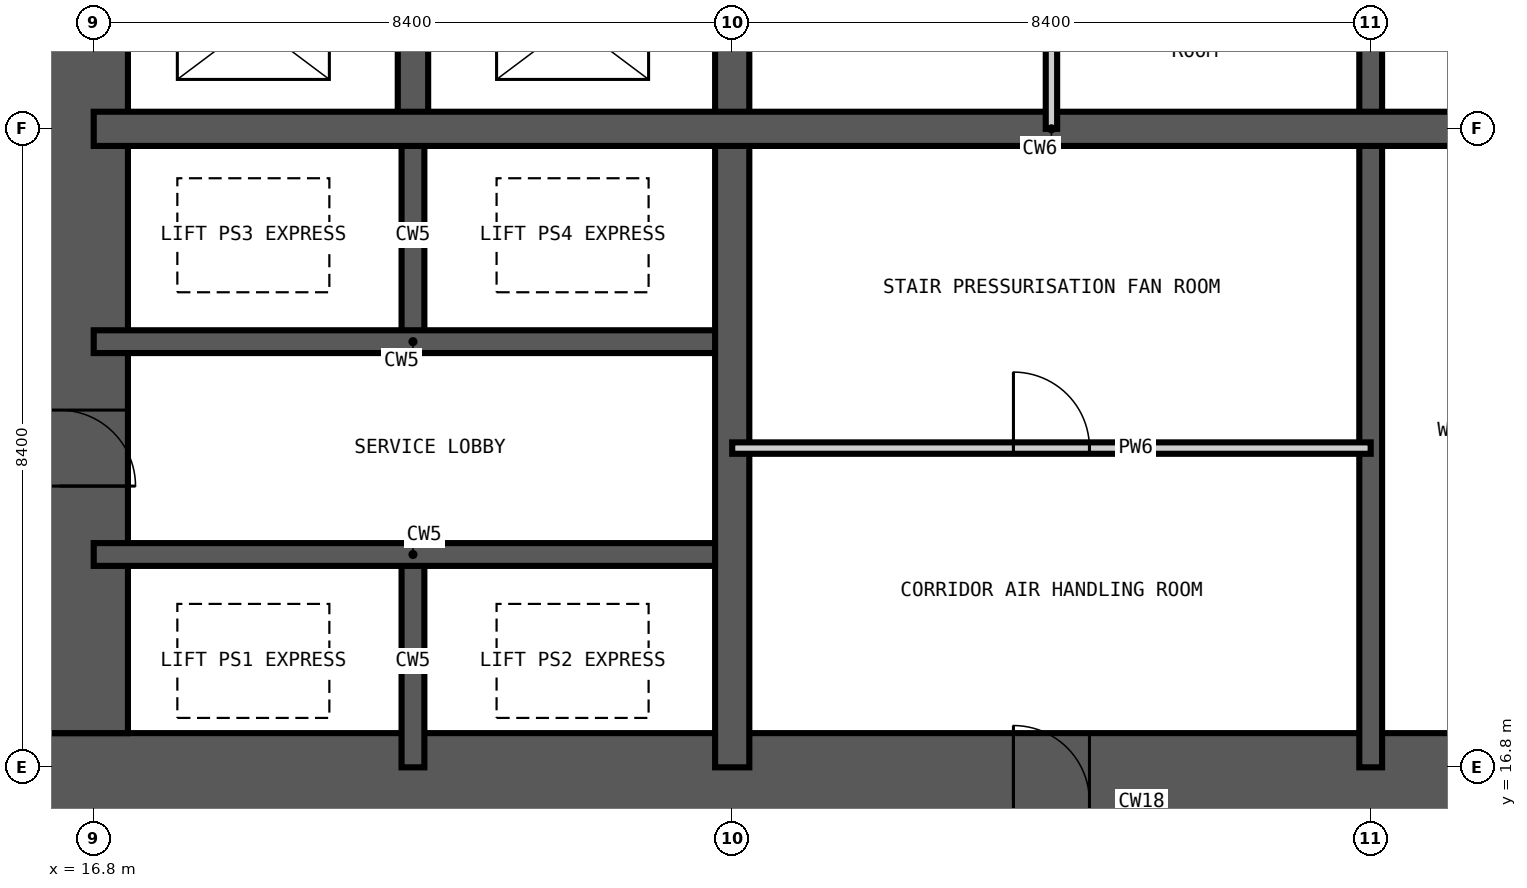
"""IFC4 building model, lengths in metres.
Left out: names, types, materials, properties, quantities, classifications, styles, units other than length and angle.
Written with IfcOpenShell. Run it as: python <this file> out.ifc"""

import sys

from ifc_helpers import new_model, si_unit, direction, frame, frame_2d, origin, place, context, subcontext, project, spatial, rectangle, extrude, element, fill, save


model = new_model("IFC4")
c1 = context("Model", 3, precision=1e-05, world=origin(), true_north=direction((0.0, 1.0)))
c2 = subcontext(c1, "Body", "Model", "MODEL_VIEW")
j1 = project(units=[si_unit("LENGTHUNIT", "METRE"), si_unit("PLANEANGLEUNIT", "RADIAN")], contexts=[c1])
p1 = place(None, origin())
s1 = spatial("IfcSite", under=j1, at=p1, CompositionType="ELEMENT")
p2 = place(p1, origin())
s2 = spatial("IfcBuilding", under=s1, at=p2, CompositionType="ELEMENT")
p3 = place(p2, frame((0.0, 0.0, 34.2)))
s3 = spatial("IfcBuildingStorey", under=s2, at=p3, CompositionType="ELEMENT", Elevation=34.2)
p4 = place(p3, frame((15.45, 16.35, -0.35), z_axis=(0.0, 0.0, 1.0), x_axis=(1.0, 0.0, 0.0)))
e1 = element("IfcWall", 1, at=p4, inside=s3, PredefinedType="SHEAR", context=c2, shape_type="SweptSolid", body=[
    extrude(rectangle(XDim=27.9, YDim=1.8, at=frame_2d((13.95, 0.0))), origin(), (0.0, 0.0, 1.0), 3.6),
])
p5 = place(p4, frame((13.45, 0.0, 0.35)))
e2 = element("IfcOpeningElement", 2, at=p5, cuts=e1, PredefinedType="OPENING", context=c2, shape_type="SweptSolid", body=[
    extrude(rectangle(XDim=1.0, YDim=2.1, at=frame_2d((0.5, 1.05))), frame((0.0, 0.91, 0.0), z_axis=(0.0, -1.0, 0.0), x_axis=(1.0, 0.0, 0.0)), (0.0, 0.0, 1.0), 1.82),
])
p6 = place(p4, frame((19.75, 0.0, 0.35)))
e3 = element("IfcOpeningElement", 3, at=p6, cuts=e1, PredefinedType="OPENING", context=c2, shape_type="SweptSolid", body=[
    extrude(rectangle(XDim=1.0, YDim=2.1, at=frame_2d((0.5, 1.05))), frame((0.0, 0.91, 0.0), z_axis=(0.0, -1.0, 0.0), x_axis=(1.0, 0.0, 0.0)), (0.0, 0.0, 1.0), 1.82),
])
p7 = place(p3, frame((16.35, 41.55, -0.35), z_axis=(0.0, 0.0, 1.0), x_axis=(0.0, -1.0, 0.0)))
e4 = element("IfcWall", 4, at=p7, inside=s3, PredefinedType="SHEAR", context=c2, shape_type="SweptSolid", body=[
    extrude(rectangle(XDim=24.3, YDim=1.8, at=frame_2d((12.15, 0.0))), origin(), (0.0, 0.0, 1.0), 3.6),
])
p8 = place(p7, frame((11.25, 0.0, 0.35)))
e5 = element("IfcOpeningElement", 5, at=p8, cuts=e4, PredefinedType="OPENING", context=c2, shape_type="SweptSolid", body=[
    extrude(rectangle(XDim=1.8, YDim=2.2, at=frame_2d((0.9, 1.1))), frame((0.0, 0.91, 0.0), z_axis=(0.0, -1.0, 0.0), x_axis=(1.0, 0.0, 0.0)), (0.0, 0.0, 1.0), 1.82),
])
p9 = place(p7, frame((20.05, 0.0, 0.35)))
e6 = element("IfcOpeningElement", 6, at=p9, cuts=e4, PredefinedType="OPENING", context=c2, shape_type="SweptSolid", body=[
    extrude(rectangle(XDim=1.0, YDim=2.1, at=frame_2d((0.5, 1.05))), frame((0.0, 0.91, 0.0), z_axis=(0.0, -1.0, 0.0), x_axis=(1.0, 0.0, 0.0)), (0.0, 0.0, 1.0), 1.82),
])
p10 = place(p7, frame((5.35, 0.0, 0.35)))
e7 = element("IfcOpeningElement", 7, at=p10, cuts=e4, PredefinedType="OPENING", context=c2, shape_type="SweptSolid", body=[
    extrude(rectangle(XDim=1.0, YDim=2.1, at=frame_2d((0.5, 1.05))), frame((0.0, 0.91, 0.0), z_axis=(0.0, -1.0, 0.0), x_axis=(1.0, 0.0, 0.0)), (0.0, 0.0, 1.0), 1.82),
])
for number, where, z_axis, x_axis in (
    (8, (21.0, 16.8, -0.35), (0.0, 0.0, 1.0), (0.0, 1.0, 0.0)),
    (9, (21.0, 22.4, -0.35), (0.0, 0.0, 1.0), (0.0, 1.0, 0.0)),
):
    element("IfcWall", number, at=place(p3, frame(where, z_axis=z_axis, x_axis=x_axis)), inside=s3, PredefinedType="SHEAR", context=c2, shape_type="SweptSolid", body=[
        extrude(rectangle(XDim=2.8, YDim=0.3, at=frame_2d((1.4, 0.0))), origin(), (0.0, 0.0, 1.0), 3.6),
    ])
p11 = place(p3, frame((33.6, 16.8, -0.35), z_axis=(0.0, 0.0, 1.0), x_axis=(0.0, 1.0, 0.0)))
e10 = element("IfcWall", 10, at=p11, inside=s3, PredefinedType="SHEAR", context=c2, shape_type="SweptSolid", body=[
    extrude(rectangle(XDim=25.2, YDim=0.3, at=frame_2d((12.6, 0.0))), origin(), (0.0, 0.0, 1.0), 3.6),
])
p12 = place(p11, frame((22.5, 0.0, 0.35)))
e11 = element("IfcOpeningElement", 11, at=p12, cuts=e10, PredefinedType="OPENING", context=c2, shape_type="SweptSolid", body=[
    extrude(rectangle(XDim=1.2, YDim=2.2, at=frame_2d((0.6, 1.1))), frame((0.0, 0.16, 0.0), z_axis=(0.0, -1.0, 0.0), x_axis=(1.0, 0.0, 0.0)), (0.0, 0.0, 1.0), 0.32),
])
p13 = place(p11, frame((18.3, 0.0, 0.35)))
e12 = element("IfcOpeningElement", 12, at=p13, cuts=e10, PredefinedType="OPENING", context=c2, shape_type="SweptSolid", body=[
    extrude(rectangle(XDim=1.2, YDim=2.2, at=frame_2d((0.6, 1.1))), frame((0.0, 0.16, 0.0), z_axis=(0.0, -1.0, 0.0), x_axis=(1.0, 0.0, 0.0)), (0.0, 0.0, 1.0), 0.32),
])
p14 = place(p11, frame((12.1, 0.0, 0.35)))
e13 = element("IfcOpeningElement", 13, at=p14, cuts=e10, PredefinedType="OPENING", context=c2, shape_type="SweptSolid", body=[
    extrude(rectangle(XDim=1.0, YDim=2.1, at=frame_2d((0.5, 1.05))), frame((0.0, 0.16, 0.0), z_axis=(0.0, -1.0, 0.0), x_axis=(1.0, 0.0, 0.0)), (0.0, 0.0, 1.0), 0.32),
])
for number, where, z_axis, x_axis in (
    (14, (16.8, 19.6, -0.35), (0.0, 0.0, 1.0), (1.0, 0.0, 0.0)),
    (15, (16.8, 22.4, -0.35), (0.0, 0.0, 1.0), (1.0, 0.0, 0.0)),
):
    element("IfcWall", number, at=place(p3, frame(where, z_axis=z_axis, x_axis=x_axis)), inside=s3, PredefinedType="SHEAR", context=c2, shape_type="SweptSolid", body=[
        extrude(rectangle(XDim=8.4, YDim=0.3, at=frame_2d((4.2, 0.0))), origin(), (0.0, 0.0, 1.0), 3.6),
    ])
p15 = place(p3, frame((21.0, 25.2, -0.35), z_axis=(0.0, 0.0, 1.0), x_axis=(0.0, 1.0, 0.0)))
e16 = element("IfcWall", 16, at=p15, inside=s3, PredefinedType="SHEAR", context=c2, shape_type="SweptSolid", body=[
    extrude(rectangle(XDim=2.8, YDim=0.4, at=frame_2d((1.4, 0.0))), origin(), (0.0, 0.0, 1.0), 3.6),
])
for number, where, z_axis, x_axis in (
    (17, (25.2, 16.8, -0.35), (0.0, 0.0, 1.0), (0.0, 1.0, 0.0)),
    (18, (16.8, 25.2, -0.35), (0.0, 0.0, 1.0), (1.0, 0.0, 0.0)),
):
    element("IfcWall", number, at=place(p3, frame(where, z_axis=z_axis, x_axis=x_axis)), inside=s3, PredefinedType="SHEAR", context=c2, shape_type="SweptSolid", body=[
        extrude(rectangle(XDim=25.2, YDim=0.45, at=frame_2d((12.6, 0.0))), origin(), (0.0, 0.0, 1.0), 3.6),
    ])
p16 = place(p3, frame((29.4, 25.2, 0.0), z_axis=(0.0, 0.0, 1.0), x_axis=(0.0, 1.0, 0.0)))
e19 = element("IfcWall", 19, at=p16, inside=s3, PredefinedType="PARTITIONING", context=c2, shape_type="SweptSolid", body=[
    extrude(rectangle(XDim=8.4, YDim=0.15, at=frame_2d((4.2, 0.0))), origin(), (0.0, 0.0, 1.0), 3.25),
])
p17 = place(p16, frame((3.7, 0.0, 0.0)))
e20 = element("IfcOpeningElement", 20, at=p17, cuts=e19, PredefinedType="OPENING", context=c2, shape_type="SweptSolid", body=[
    extrude(rectangle(XDim=1.0, YDim=2.1, at=frame_2d((0.5, 1.05))), frame((0.0, 0.085, 0.0), z_axis=(0.0, -1.0, 0.0), x_axis=(1.0, 0.0, 0.0)), (0.0, 0.0, 1.0), 0.17),
])
p18 = place(p3, frame((25.2, 21.0, 0.0), z_axis=(0.0, 0.0, 1.0), x_axis=(1.0, 0.0, 0.0)))
e21 = element("IfcWall", 21, at=p18, inside=s3, PredefinedType="PARTITIONING", context=c2, shape_type="SweptSolid", body=[
    extrude(rectangle(XDim=8.4, YDim=0.15, at=frame_2d((4.2, 0.0))), origin(), (0.0, 0.0, 1.0), 3.25),
])
p19 = place(p18, frame((3.7, 0.0, 0.0)))
e22 = element("IfcOpeningElement", 22, at=p19, cuts=e21, PredefinedType="OPENING", context=c2, shape_type="SweptSolid", body=[
    extrude(rectangle(XDim=1.0, YDim=2.1, at=frame_2d((0.5, 1.05))), frame((0.0, 0.085, 0.0), z_axis=(0.0, -1.0, 0.0), x_axis=(1.0, 0.0, 0.0)), (0.0, 0.0, 1.0), 0.17),
])
p20 = place(p9, origin())
e23 = element("IfcDoor", 23, at=p20, inside=s3, OperationType="SINGLE_SWING_RIGHT", PredefinedType="DOOR", context=c2, shape_type="SweptSolid", body=[
    extrude(rectangle(XDim=1.0, YDim=2.1, at=frame_2d((0.5, 1.05))), frame((0.0, 0.025, 0.0), z_axis=(0.0, -1.0, 0.0), x_axis=(1.0, 0.0, 0.0)), (0.0, 0.0, 1.0), 0.05),
])
fill(e6, e23)
p21 = place(p5, origin())
e24 = element("IfcDoor", 24, at=p21, inside=s3, OperationType="SINGLE_SWING_LEFT", PredefinedType="DOOR", context=c2, shape_type="SweptSolid", body=[
    extrude(rectangle(XDim=1.0, YDim=2.1, at=frame_2d((0.5, 1.05))), frame((0.0, 0.025, 0.0), z_axis=(0.0, -1.0, 0.0), x_axis=(1.0, 0.0, 0.0)), (0.0, 0.0, 1.0), 0.05),
])
fill(e2, e24)
p22 = place(p19, origin())
e25 = element("IfcDoor", 25, at=p22, inside=s3, OperationType="SINGLE_SWING_LEFT", PredefinedType="DOOR", context=c2, shape_type="SweptSolid", body=[
    extrude(rectangle(XDim=1.0, YDim=2.1, at=frame_2d((0.5, 1.05))), frame((0.0, 0.025, 0.0), z_axis=(0.0, -1.0, 0.0), x_axis=(1.0, 0.0, 0.0)), (0.0, 0.0, 1.0), 0.05),
])
fill(e22, e25)
save(model, sys.argv[1])
